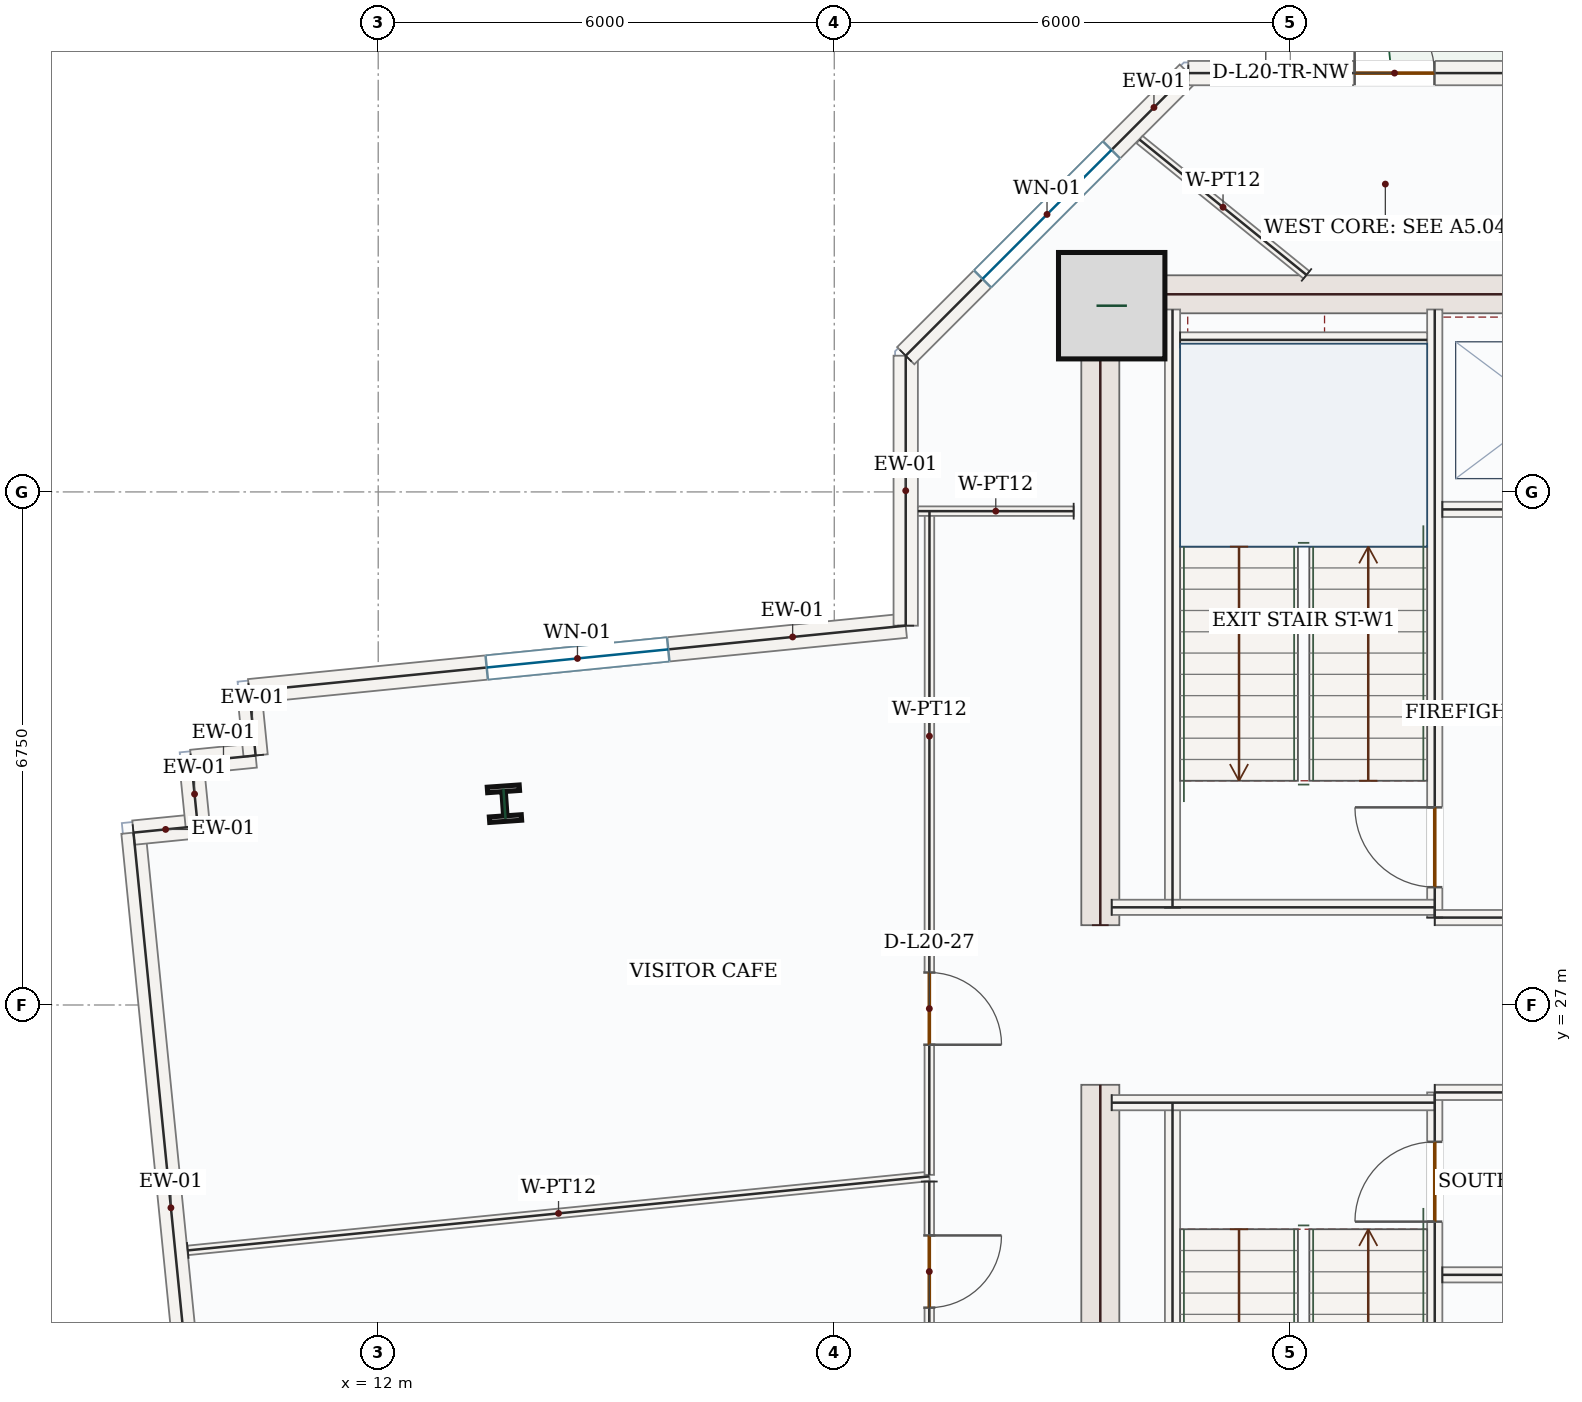
"""IFC4 building model, lengths in metres.
Left out: names, types, materials, properties, quantities, classifications, styles, units other than length and angle.
Written with IfcOpenShell. Run it as: python <this file> out.ifc"""

import sys

from ifc_helpers import new_model, si_unit, direction, frame, frame_2d, origin, origin_2d, place, context, subcontext, project, spatial, rectangle, i_section, extrude, source, transform, mapped, element, fill, save


model = new_model("IFC4")
c1 = context("Model", 3, precision=1e-05, world=origin(), true_north=direction((0.0, 1.0)))
c2 = subcontext(c1, "Body", "Model", "MODEL_VIEW")
j1 = project(units=[si_unit("LENGTHUNIT", "METRE"), si_unit("PLANEANGLEUNIT", "RADIAN")], contexts=[c1])
p1 = place(None, origin())
s1 = spatial("IfcSite", under=j1, at=p1, CompositionType="ELEMENT")
p2 = place(p1, origin())
s2 = spatial("IfcBuilding", under=s1, at=p2, CompositionType="ELEMENT")
p3 = place(p2, frame((0.0, 0.0, 92.1)))
s3 = spatial("IfcBuildingStorey", under=s2, at=p3, CompositionType="ELEMENT", Elevation=92.1)
m1 = source(origin(), c2, "Body", "SweptSolid", [
    extrude(rectangle(XDim=8.55, YDim=0.5, at=frame_2d((4.275, 0.0))), origin(), (0.0, 0.0, 1.0), 3.95),
])
for number, where, z_axis, x_axis in (
    (1, (21.5, 17.4, 0.0), (0.0, 0.0, 1.0), (0.0, 1.0, 0.0)),
    (2, (21.5, 28.05, 0.0), (0.0, 0.0, 1.0), (0.0, 1.0, 0.0)),
):
    element("IfcWall", number, at=place(p3, frame(where, z_axis=z_axis, x_axis=x_axis)), inside=s3, PredefinedType="SHEAR", context=c2, shape_type="MappedRepresentation", body=[
        mapped(m1, transform((0.0, 0.0, 0.0), x_axis=(1.0, 0.0, 0.0), y_axis=(0.0, 1.0, 0.0), z_axis=(0.0, 0.0, 1.0), scale=1.0)),
    ])
m2 = source(origin(), c2, "Body", "SweptSolid", [
    extrude(rectangle(XDim=7.0, YDim=0.5, at=frame_2d((3.5, 0.0))), origin(), (0.0, 0.0, 1.0), 3.95),
])
p4 = place(p3, frame((21.75, 36.35, 0.0), z_axis=(0.0, 0.0, 1.0), x_axis=(1.0, 0.0, 0.0)))
e3 = element("IfcWall", 3, at=p4, inside=s3, PredefinedType="SHEAR", context=c2, shape_type="MappedRepresentation", body=[
    mapped(m2, transform((0.0, 0.0, 0.0), x_axis=(1.0, 0.0, 0.0), y_axis=(0.0, 1.0, 0.0), z_axis=(0.0, 0.0, 1.0), scale=1.0)),
])
m3 = source(origin(), c2, "Body", "SweptSolid", [
    extrude(rectangle(XDim=1.4, YDim=1.4, at=origin_2d()), origin(), (0.0, 0.0, 1.0), 4.2),
])
p5 = place(p3, frame((21.65, 36.2, 0.0), z_axis=(0.0, 0.0, 1.0), x_axis=(1.0, 0.0, 0.0)))
e4 = element("IfcColumn", 4, at=p5, inside=s3, PredefinedType="COLUMN", context=c2, shape_type="MappedRepresentation", body=[
    mapped(m3, transform((0.0, 0.0, 0.0), x_axis=(1.0, 0.0, 0.0), y_axis=(0.0, 1.0, 0.0), z_axis=(0.0, 0.0, 1.0), scale=1.0)),
])
m4 = source(origin(), c2, "Body", "SweptSolid", [
    extrude(i_section(OverallWidth=0.421, OverallDepth=0.465, WebThickness=0.045, FlangeThickness=0.073, FilletRadius=0.018, at=origin_2d()), origin(), (0.0, 0.0, 1.0), 4.2),
])
p6 = place(p3, frame((13.661, 29.648, 0.0), z_axis=(0.0, 0.0, 1.0), x_axis=(0.99756405026, 0.069756473744, 0.0)))
e5 = element("IfcColumn", 5, at=p6, inside=s3, PredefinedType="COLUMN", context=c2, shape_type="MappedRepresentation", body=[
    mapped(m4, transform((0.0, 0.0, 0.0), x_axis=(1.0, 0.0, 0.0), y_axis=(0.0, 1.0, 0.0), z_axis=(0.0, 0.0, 1.0), scale=1.0)),
])
m5 = source(origin(), c2, "Body", "SweptSolid", [
    extrude(rectangle(XDim=9.92, YDim=0.32, at=frame_2d((4.96, 0.0))), origin(), (0.0, 0.0, 1.0), 3.95),
])
p7 = place(p3, frame((9.765, 19.397, 0.0), z_axis=(0.0, 0.0, 1.0), x_axis=(-0.099303907908, 0.995057151059, 0.0)))
e6 = element("IfcWall", 6, at=p7, inside=s3, PredefinedType="SOLIDWALL", context=c2, shape_type="MappedRepresentation", body=[
    mapped(m5, transform((0.0, 0.0, 0.0), x_axis=(1.0, 0.0, 0.0), y_axis=(0.0, 1.0, 0.0), z_axis=(0.0, 0.0, 1.0), scale=1.0)),
])
m6 = source(origin(), c2, "Body", "SweptSolid", [
    extrude(rectangle(XDim=0.85, YDim=0.32, at=frame_2d((0.425, 0.0))), origin(), (0.0, 0.0, 1.0), 3.95),
])
for number, where, z_axis, x_axis in (
    (7, (8.78, 29.268, 0.0), (0.0, 0.0, 1.0), (0.995, 0.099, 0.0)),
    (8, (9.626, 29.352, 0.0), (0.0, 0.0, 1.0), (-0.099, 0.995, 0.0)),
    (9, (9.542, 30.198, 0.0), (0.0, 0.0, 1.0), (0.995, 0.099, 0.0)),
    (10, (10.387, 30.282, 0.0), (0.0, 0.0, 1.0), (-0.099, 0.995, 0.0)),
):
    element("IfcWall", number, at=place(p3, frame(where, z_axis=z_axis, x_axis=x_axis)), inside=s3, PredefinedType="SOLIDWALL", context=c2, shape_type="MappedRepresentation", body=[
        mapped(m6, transform((0.0, 0.0, 0.0), x_axis=(1.0, 0.0, 0.0), y_axis=(0.0, 1.0, 0.0), z_axis=(0.0, 0.0, 1.0), scale=1.0)),
    ])
p8 = place(p3, frame((10.303, 31.128, 0.0), z_axis=(0.0, 0.0, 1.0), x_axis=(0.995055831351, 0.099317130918, 0.0)))
e11 = element("IfcWall", 11, at=p8, inside=s3, PredefinedType="SOLIDWALL", context=c2, shape_type="SweptSolid", body=[
    extrude(rectangle(XDim=8.68, YDim=0.32, at=frame_2d((4.34, 0.0))), origin(), (0.0, 0.0, 1.0), 3.95),
])
p9 = place(p8, frame((3.14, 0.0, 0.85)))
e12 = element("IfcOpeningElement", 12, at=p9, cuts=e11, PredefinedType="OPENING", context=c2, shape_type="SweptSolid", body=[
    extrude(rectangle(XDim=2.4, YDim=1.8, at=frame_2d((1.2, 0.9))), frame((0.0, 0.17, 0.0), z_axis=(0.0, -1.0, 0.0), x_axis=(1.0, 0.0, 0.0)), (0.0, 0.0, 1.0), 0.34),
])
m7 = source(origin(), c2, "Body", "SweptSolid", [
    extrude(rectangle(XDim=3.552, YDim=0.32, at=frame_2d((1.776, 0.0))), origin(), (0.0, 0.0, 1.0), 3.95),
])
p10 = place(p3, frame((18.94, 31.99, 0.0), z_axis=(0.0, 0.0, 1.0), x_axis=(0.0, 1.0, 0.0)))
e13 = element("IfcWall", 13, at=p10, inside=s3, PredefinedType="SOLIDWALL", context=c2, shape_type="MappedRepresentation", body=[
    mapped(m7, transform((0.0, 0.0, 0.0), x_axis=(1.0, 0.0, 0.0), y_axis=(0.0, 1.0, 0.0), z_axis=(0.0, 0.0, 1.0), scale=1.0)),
])
p11 = place(p3, frame((18.94, 35.542, 0.0), z_axis=(0.0, 0.0, 1.0), x_axis=(0.707106781187, 0.707106781187, 0.0)))
e14 = element("IfcWall", 14, at=p11, inside=s3, PredefinedType="SOLIDWALL", context=c2, shape_type="SweptSolid", body=[
    extrude(rectangle(XDim=5.258, YDim=0.32, at=frame_2d((2.629, 0.0))), origin(), (0.0, 0.0, 1.0), 3.95),
])
p12 = place(p11, frame((1.429, 0.0, 0.85)))
e15 = element("IfcOpeningElement", 15, at=p12, cuts=e14, PredefinedType="OPENING", context=c2, shape_type="SweptSolid", body=[
    extrude(rectangle(XDim=2.4, YDim=1.8, at=frame_2d((1.2, 0.9))), frame((0.0, 0.17, 0.0), z_axis=(0.0, -1.0, 0.0), x_axis=(1.0, 0.0, 0.0)), (0.0, 0.0, 1.0), 0.34),
])
p13 = place(p3, frame((22.658, 39.26, 0.0), z_axis=(0.0, 0.0, 1.0), x_axis=(1.0, 0.0, 0.0)))
e16 = element("IfcWall", 16, at=p13, inside=s3, PredefinedType="SOLIDWALL", context=c2, shape_type="SweptSolid", body=[
    extrude(rectangle(XDim=5.425, YDim=0.32, at=frame_2d((2.713, 0.0))), origin(), (0.0, 0.0, 1.0), 3.95),
])
p14 = place(p13, frame((2.188, 0.0, 0.0)))
e17 = element("IfcOpeningElement", 17, at=p14, cuts=e16, PredefinedType="OPENING", context=c2, shape_type="SweptSolid", body=[
    extrude(rectangle(XDim=1.05, YDim=2.15, at=frame_2d((0.525, 1.075))), frame((0.0, 0.17, 0.0), z_axis=(0.0, -1.0, 0.0), x_axis=(1.0, 0.0, 0.0)), (0.0, 0.0, 1.0), 0.34),
])
m8 = source(origin(), c2, "Body", "SweptSolid", [
    extrude(rectangle(XDim=7.87, YDim=0.2, at=frame_2d((3.935, 0.0))), origin(), (0.0, 0.0, 1.0), 3.95),
])
for number, where, z_axis, x_axis in (
    (18, (22.45, 17.85, 0.0), (0.0, 0.0, 1.0), (0.0, 1.0, 0.0)),
    (19, (22.45, 28.28, 0.0), (0.0, 0.0, 1.0), (0.0, 1.0, 0.0)),
):
    element("IfcWall", number, at=place(p3, frame(where, z_axis=z_axis, x_axis=x_axis)), inside=s3, PredefinedType="SOLIDWALL", context=c2, shape_type="MappedRepresentation", body=[
        mapped(m8, transform((0.0, 0.0, 0.0), x_axis=(1.0, 0.0, 0.0), y_axis=(0.0, 1.0, 0.0), z_axis=(0.0, 0.0, 1.0), scale=1.0)),
    ])
p15 = place(p3, frame((25.9, 17.85, 0.0), z_axis=(0.0, 0.0, 1.0), x_axis=(0.0, 1.0, 0.0)))
e20 = element("IfcWall", 20, at=p15, inside=s3, PredefinedType="SOLIDWALL", context=c2, shape_type="SweptSolid", body=[
    extrude(rectangle(XDim=8.0, YDim=0.2, at=frame_2d((4.0, 0.0))), origin(), (0.0, 0.0, 1.0), 3.95),
])
p16 = place(p15, frame((6.3, 0.0, 0.0)))
e21 = element("IfcOpeningElement", 21, at=p16, cuts=e20, PredefinedType="OPENING", context=c2, shape_type="SweptSolid", body=[
    extrude(rectangle(XDim=1.05, YDim=2.15, at=frame_2d((0.525, 1.075))), frame((0.0, 0.11, 0.0), z_axis=(0.0, -1.0, 0.0), x_axis=(1.0, 0.0, 0.0)), (0.0, 0.0, 1.0), 0.22),
])
p17 = place(p3, frame((25.9, 28.15, 0.0), z_axis=(0.0, 0.0, 1.0), x_axis=(0.0, 1.0, 0.0)))
e22 = element("IfcWall", 22, at=p17, inside=s3, PredefinedType="SOLIDWALL", context=c2, shape_type="SweptSolid", body=[
    extrude(rectangle(XDim=8.0, YDim=0.2, at=frame_2d((4.0, 0.0))), origin(), (0.0, 0.0, 1.0), 3.95),
])
p18 = place(p17, frame((0.4, 0.0, 0.0)))
e23 = element("IfcOpeningElement", 23, at=p18, cuts=e22, PredefinedType="OPENING", context=c2, shape_type="SweptSolid", body=[
    extrude(rectangle(XDim=1.05, YDim=2.15, at=frame_2d((0.525, 1.075))), frame((0.0, 0.11, 0.0), z_axis=(0.0, -1.0, 0.0), x_axis=(1.0, 0.0, 0.0)), (0.0, 0.0, 1.0), 0.22),
])
m9 = source(origin(), c2, "Body", "SweptSolid", [
    extrude(rectangle(XDim=4.25, YDim=0.2, at=frame_2d((2.125, 0.0))), origin(), (0.0, 0.0, 1.0), 3.95),
])
p19 = place(p3, frame((21.65, 25.715, 0.0), z_axis=(0.0, 0.0, 1.0), x_axis=(1.0, 0.0, 0.0)))
e24 = element("IfcWall", 24, at=p19, inside=s3, PredefinedType="SOLIDWALL", context=c2, shape_type="MappedRepresentation", body=[
    mapped(m9, transform((0.0, 0.0, 0.0), x_axis=(1.0, 0.0, 0.0), y_axis=(0.0, 1.0, 0.0), z_axis=(0.0, 0.0, 1.0), scale=1.0)),
])
m10 = source(origin(), c2, "Body", "SweptSolid", [
    extrude(rectangle(XDim=3.0, YDim=0.2, at=frame_2d((1.5, 0.0))), origin(), (0.0, 0.0, 1.0), 3.95),
])
p20 = place(p3, frame((25.9, 25.85, 0.0), z_axis=(0.0, 0.0, 1.0), x_axis=(1.0, 0.0, 0.0)))
e25 = element("IfcWall", 25, at=p20, inside=s3, PredefinedType="SOLIDWALL", context=c2, shape_type="MappedRepresentation", body=[
    mapped(m10, transform((0.0, 0.0, 0.0), x_axis=(1.0, 0.0, 0.0), y_axis=(0.0, 1.0, 0.0), z_axis=(0.0, 0.0, 1.0), scale=1.0)),
])
p21 = place(p3, frame((21.65, 28.285, 0.0), z_axis=(0.0, 0.0, 1.0), x_axis=(1.0, 0.0, 0.0)))
e26 = element("IfcWall", 26, at=p21, inside=s3, PredefinedType="SOLIDWALL", context=c2, shape_type="MappedRepresentation", body=[
    mapped(m9, transform((0.0, 0.0, 0.0), x_axis=(1.0, 0.0, 0.0), y_axis=(0.0, 1.0, 0.0), z_axis=(0.0, 0.0, 1.0), scale=1.0)),
])
p22 = place(p3, frame((25.9, 28.15, 0.0), z_axis=(0.0, 0.0, 1.0), x_axis=(1.0, 0.0, 0.0)))
e27 = element("IfcWall", 27, at=p22, inside=s3, PredefinedType="SOLIDWALL", context=c2, shape_type="MappedRepresentation", body=[
    mapped(m10, transform((0.0, 0.0, 0.0), x_axis=(1.0, 0.0, 0.0), y_axis=(0.0, 1.0, 0.0), z_axis=(0.0, 0.0, 1.0), scale=1.0)),
])
m11 = source(origin(), c2, "Body", "SweptSolid", [
    extrude(rectangle(XDim=3.25, YDim=0.2, at=frame_2d((1.625, 0.0))), origin(), (0.0, 0.0, 1.0), 3.95),
])
p23 = place(p3, frame((22.55, 35.75, 0.0), z_axis=(0.0, 0.0, 1.0), x_axis=(1.0, 0.0, 0.0)))
e28 = element("IfcWall", 28, at=p23, inside=s3, PredefinedType="SOLIDWALL", context=c2, shape_type="MappedRepresentation", body=[
    mapped(m11, transform((0.0, 0.0, 0.0), x_axis=(1.0, 0.0, 0.0), y_axis=(0.0, 1.0, 0.0), z_axis=(0.0, 0.0, 1.0), scale=1.0)),
])
p24 = place(p3, frame((26.0, 33.52, 0.0), z_axis=(0.0, 0.0, 1.0), x_axis=(1.0, 0.0, 0.0)))
e29 = element("IfcWall", 29, at=p24, inside=s3, PredefinedType="SOLIDWALL", context=c2, shape_type="SweptSolid", body=[
    extrude(rectangle(XDim=2.75, YDim=0.2, at=frame_2d((1.375, 0.0))), origin(), (0.0, 0.0, 1.0), 3.95),
])
p25 = place(p24, frame((0.82, 0.0, 0.0)))
e30 = element("IfcOpeningElement", 30, at=p25, cuts=e29, PredefinedType="OPENING", context=c2, shape_type="SweptSolid", body=[
    extrude(rectangle(XDim=1.1, YDim=2.15, at=frame_2d((0.55, 1.075))), frame((0.0, 0.11, 0.0), z_axis=(0.0, -1.0, 0.0), x_axis=(1.0, 0.0, 0.0)), (0.0, 0.0, 1.0), 0.22),
])
m12 = source(origin(), c2, "Body", "SweptSolid", [
    extrude(rectangle(XDim=2.75, YDim=0.2, at=frame_2d((1.375, 0.0))), origin(), (0.0, 0.0, 1.0), 3.95),
])
p26 = place(p3, frame((26.0, 23.45, 0.0), z_axis=(0.0, 0.0, 1.0), x_axis=(1.0, 0.0, 0.0)))
e31 = element("IfcWall", 31, at=p26, inside=s3, PredefinedType="SOLIDWALL", context=c2, shape_type="MappedRepresentation", body=[
    mapped(m12, transform((0.0, 0.0, 0.0), x_axis=(1.0, 0.0, 0.0), y_axis=(0.0, 1.0, 0.0), z_axis=(0.0, 0.0, 1.0), scale=1.0)),
])
m13 = source(origin(), c2, "Body", "SweptSolid", [
    extrude(rectangle(XDim=2.827, YDim=0.125, at=frame_2d((1.414, 0.0))), origin(), (0.0, 0.0, 1.0), 3.95),
])
p27 = place(p3, frame((24.213, 36.605, 0.0), z_axis=(0.0, 0.0, 1.0), x_axis=(-0.776808269954, 0.62973717671, 0.0)))
e32 = element("IfcWall", 32, at=p27, inside=s3, PredefinedType="PARTITIONING", context=c2, shape_type="MappedRepresentation", body=[
    mapped(m13, transform((0.0, 0.0, 0.0), x_axis=(1.0, 0.0, 0.0), y_axis=(0.0, 1.0, 0.0), z_axis=(0.0, 0.0, 1.0), scale=1.0)),
])
m14 = source(origin(), c2, "Body", "SweptSolid", [
    extrude(rectangle(XDim=9.804, YDim=0.125, at=frame_2d((4.902, 0.0))), origin(), (0.0, 0.0, 1.0), 3.95),
])
p28 = place(p3, frame((9.495, 23.771, 0.0), z_axis=(0.0, 0.0, 1.0), x_axis=(0.995053942122, 0.099336057238, 0.0)))
e33 = element("IfcWall", 33, at=p28, inside=s3, PredefinedType="PARTITIONING", context=c2, shape_type="MappedRepresentation", body=[
    mapped(m14, transform((0.0, 0.0, 0.0), x_axis=(1.0, 0.0, 0.0), y_axis=(0.0, 1.0, 0.0), z_axis=(0.0, 0.0, 1.0), scale=1.0)),
])
p29 = place(p3, frame((19.25, 24.677, 0.0), z_axis=(0.0, 0.0, 1.0), x_axis=(0.000116979586, -0.999999993158, 0.0)))
e34 = element("IfcWall", 34, at=p29, inside=s3, PredefinedType="PARTITIONING", context=c2, shape_type="SweptSolid", body=[
    extrude(rectangle(XDim=4.174, YDim=0.125, at=frame_2d((2.087, 0.0))), origin(), (0.0, 0.0, 1.0), 3.95),
])
p30 = place(p29, frame((0.709, 0.0, 0.0)))
e35 = element("IfcOpeningElement", 35, at=p30, cuts=e34, PredefinedType="OPENING", context=c2, shape_type="SweptSolid", body=[
    extrude(rectangle(XDim=0.95, YDim=2.15, at=frame_2d((0.475, 1.075))), frame((0.0, 0.073, 0.0), z_axis=(0.0, -1.0, 0.0), x_axis=(1.0, 0.0, 0.0)), (0.0, 0.0, 1.0), 0.145),
])
p31 = place(p3, frame((19.253, 33.497, 0.0), z_axis=(0.0, 0.0, 1.0), x_axis=(-0.000307554646, -0.999999952705, 0.0)))
e36 = element("IfcWall", 36, at=p31, inside=s3, PredefinedType="PARTITIONING", context=c2, shape_type="SweptSolid", body=[
    extrude(rectangle(XDim=8.732, YDim=0.125, at=frame_2d((4.366, 0.0))), origin(), (0.0, 0.0, 1.0), 3.95),
])
p32 = place(p31, frame((6.07, 0.0, 0.0)))
e37 = element("IfcOpeningElement", 37, at=p32, cuts=e36, PredefinedType="OPENING", context=c2, shape_type="SweptSolid", body=[
    extrude(rectangle(XDim=0.95, YDim=2.15, at=frame_2d((0.475, 1.075))), frame((0.0, 0.073, 0.0), z_axis=(0.0, -1.0, 0.0), x_axis=(1.0, 0.0, 0.0)), (0.0, 0.0, 1.0), 0.145),
])
m15 = source(origin(), c2, "Body", "SweptSolid", [
    extrude(rectangle(XDim=2.049, YDim=0.125, at=frame_2d((1.025, 0.0))), origin(), (0.0, 0.0, 1.0), 3.95),
])
p33 = place(p3, frame((21.149, 33.497, 0.0), z_axis=(0.0, 0.0, 1.0), x_axis=(-0.999999936133, 0.000357398119, 0.0)))
e38 = element("IfcWall", 38, at=p33, inside=s3, PredefinedType="PARTITIONING", context=c2, shape_type="MappedRepresentation", body=[
    mapped(m15, transform((0.0, 0.0, 0.0), x_axis=(1.0, 0.0, 0.0), y_axis=(0.0, 1.0, 0.0), z_axis=(0.0, 0.0, 1.0), scale=1.0)),
])
m16 = source(origin(), c2, "Body", "SweptSolid", [
    extrude(rectangle(XDim=2.4, YDim=1.8, at=frame_2d((1.2, 0.9))), frame((0.0, 0.03, 0.0), z_axis=(0.0, -1.0, 0.0), x_axis=(1.0, 0.0, 0.0)), (0.0, 0.0, 1.0), 0.06),
])
p34 = place(p9, origin())
e39 = element("IfcWindow", 39, at=p34, inside=s3, PartitioningType="DOUBLE_PANEL_VERTICAL", PredefinedType="WINDOW", context=c2, shape_type="MappedRepresentation", body=[
    mapped(m16, transform((0.0, 0.0, 0.0), x_axis=(1.0, 0.0, 0.0), y_axis=(0.0, 1.0, 0.0), z_axis=(0.0, 0.0, 1.0), scale=1.0)),
])
fill(e12, e39)
p35 = place(p12, origin())
e40 = element("IfcWindow", 40, at=p35, inside=s3, PartitioningType="DOUBLE_PANEL_VERTICAL", PredefinedType="WINDOW", context=c2, shape_type="MappedRepresentation", body=[
    mapped(m16, transform((0.0, 0.0, 0.0), x_axis=(1.0, 0.0, 0.0), y_axis=(0.0, 1.0, 0.0), z_axis=(0.0, 0.0, 1.0), scale=1.0)),
])
fill(e15, e40)
m17 = source(origin(), c2, "Body", "SweptSolid", [
    extrude(rectangle(XDim=1.05, YDim=2.15, at=frame_2d((0.525, 1.075))), frame((0.0, 0.025, 0.0), z_axis=(0.0, -1.0, 0.0), x_axis=(1.0, 0.0, 0.0)), (0.0, 0.0, 1.0), 0.05),
])
p36 = place(p14, origin())
e41 = element("IfcDoor", 41, at=p36, inside=s3, OperationType="SINGLE_SWING_LEFT", PredefinedType="DOOR", context=c2, shape_type="MappedRepresentation", body=[
    mapped(m17, transform((0.0, 0.0, 0.0), x_axis=(1.0, 0.0, 0.0), y_axis=(0.0, 1.0, 0.0), z_axis=(0.0, 0.0, 1.0), scale=1.0)),
])
fill(e17, e41)
p37 = place(p18, origin())
e42 = element("IfcDoor", 42, at=p37, inside=s3, OperationType="SINGLE_SWING_RIGHT", PredefinedType="DOOR", context=c2, shape_type="MappedRepresentation", body=[
    mapped(m17, transform((0.0, 0.0, 0.0), x_axis=(1.0, 0.0, 0.0), y_axis=(0.0, 1.0, 0.0), z_axis=(0.0, 0.0, 1.0), scale=1.0)),
])
fill(e23, e42)
p38 = place(p16, origin())
e43 = element("IfcDoor", 43, at=p38, inside=s3, OperationType="SINGLE_SWING_LEFT", PredefinedType="DOOR", context=c2, shape_type="MappedRepresentation", body=[
    mapped(m17, transform((0.0, 0.0, 0.0), x_axis=(1.0, 0.0, 0.0), y_axis=(0.0, 1.0, 0.0), z_axis=(0.0, 0.0, 1.0), scale=1.0)),
])
fill(e21, e43)
m18 = source(origin(), c2, "Body", "SweptSolid", [
    extrude(rectangle(XDim=0.95, YDim=2.15, at=frame_2d((0.475, 1.075))), frame((0.0, 0.025, 0.0), z_axis=(0.0, -1.0, 0.0), x_axis=(1.0, 0.0, 0.0)), (0.0, 0.0, 1.0), 0.05),
])
p39 = place(p32, origin())
e44 = element("IfcDoor", 44, at=p39, inside=s3, OperationType="SINGLE_SWING_RIGHT", PredefinedType="DOOR", context=c2, shape_type="MappedRepresentation", body=[
    mapped(m18, transform((0.0, 0.0, 0.0), x_axis=(1.0, 0.0, 0.0), y_axis=(0.0, 1.0, 0.0), z_axis=(0.0, 0.0, 1.0), scale=1.0)),
])
fill(e37, e44)
p40 = place(p30, origin())
e45 = element("IfcDoor", 45, at=p40, inside=s3, OperationType="SINGLE_SWING_LEFT", PredefinedType="DOOR", context=c2, shape_type="MappedRepresentation", body=[
    mapped(m18, transform((0.0, 0.0, 0.0), x_axis=(1.0, 0.0, 0.0), y_axis=(0.0, 1.0, 0.0), z_axis=(0.0, 0.0, 1.0), scale=1.0)),
])
fill(e35, e45)
save(model, sys.argv[1])
